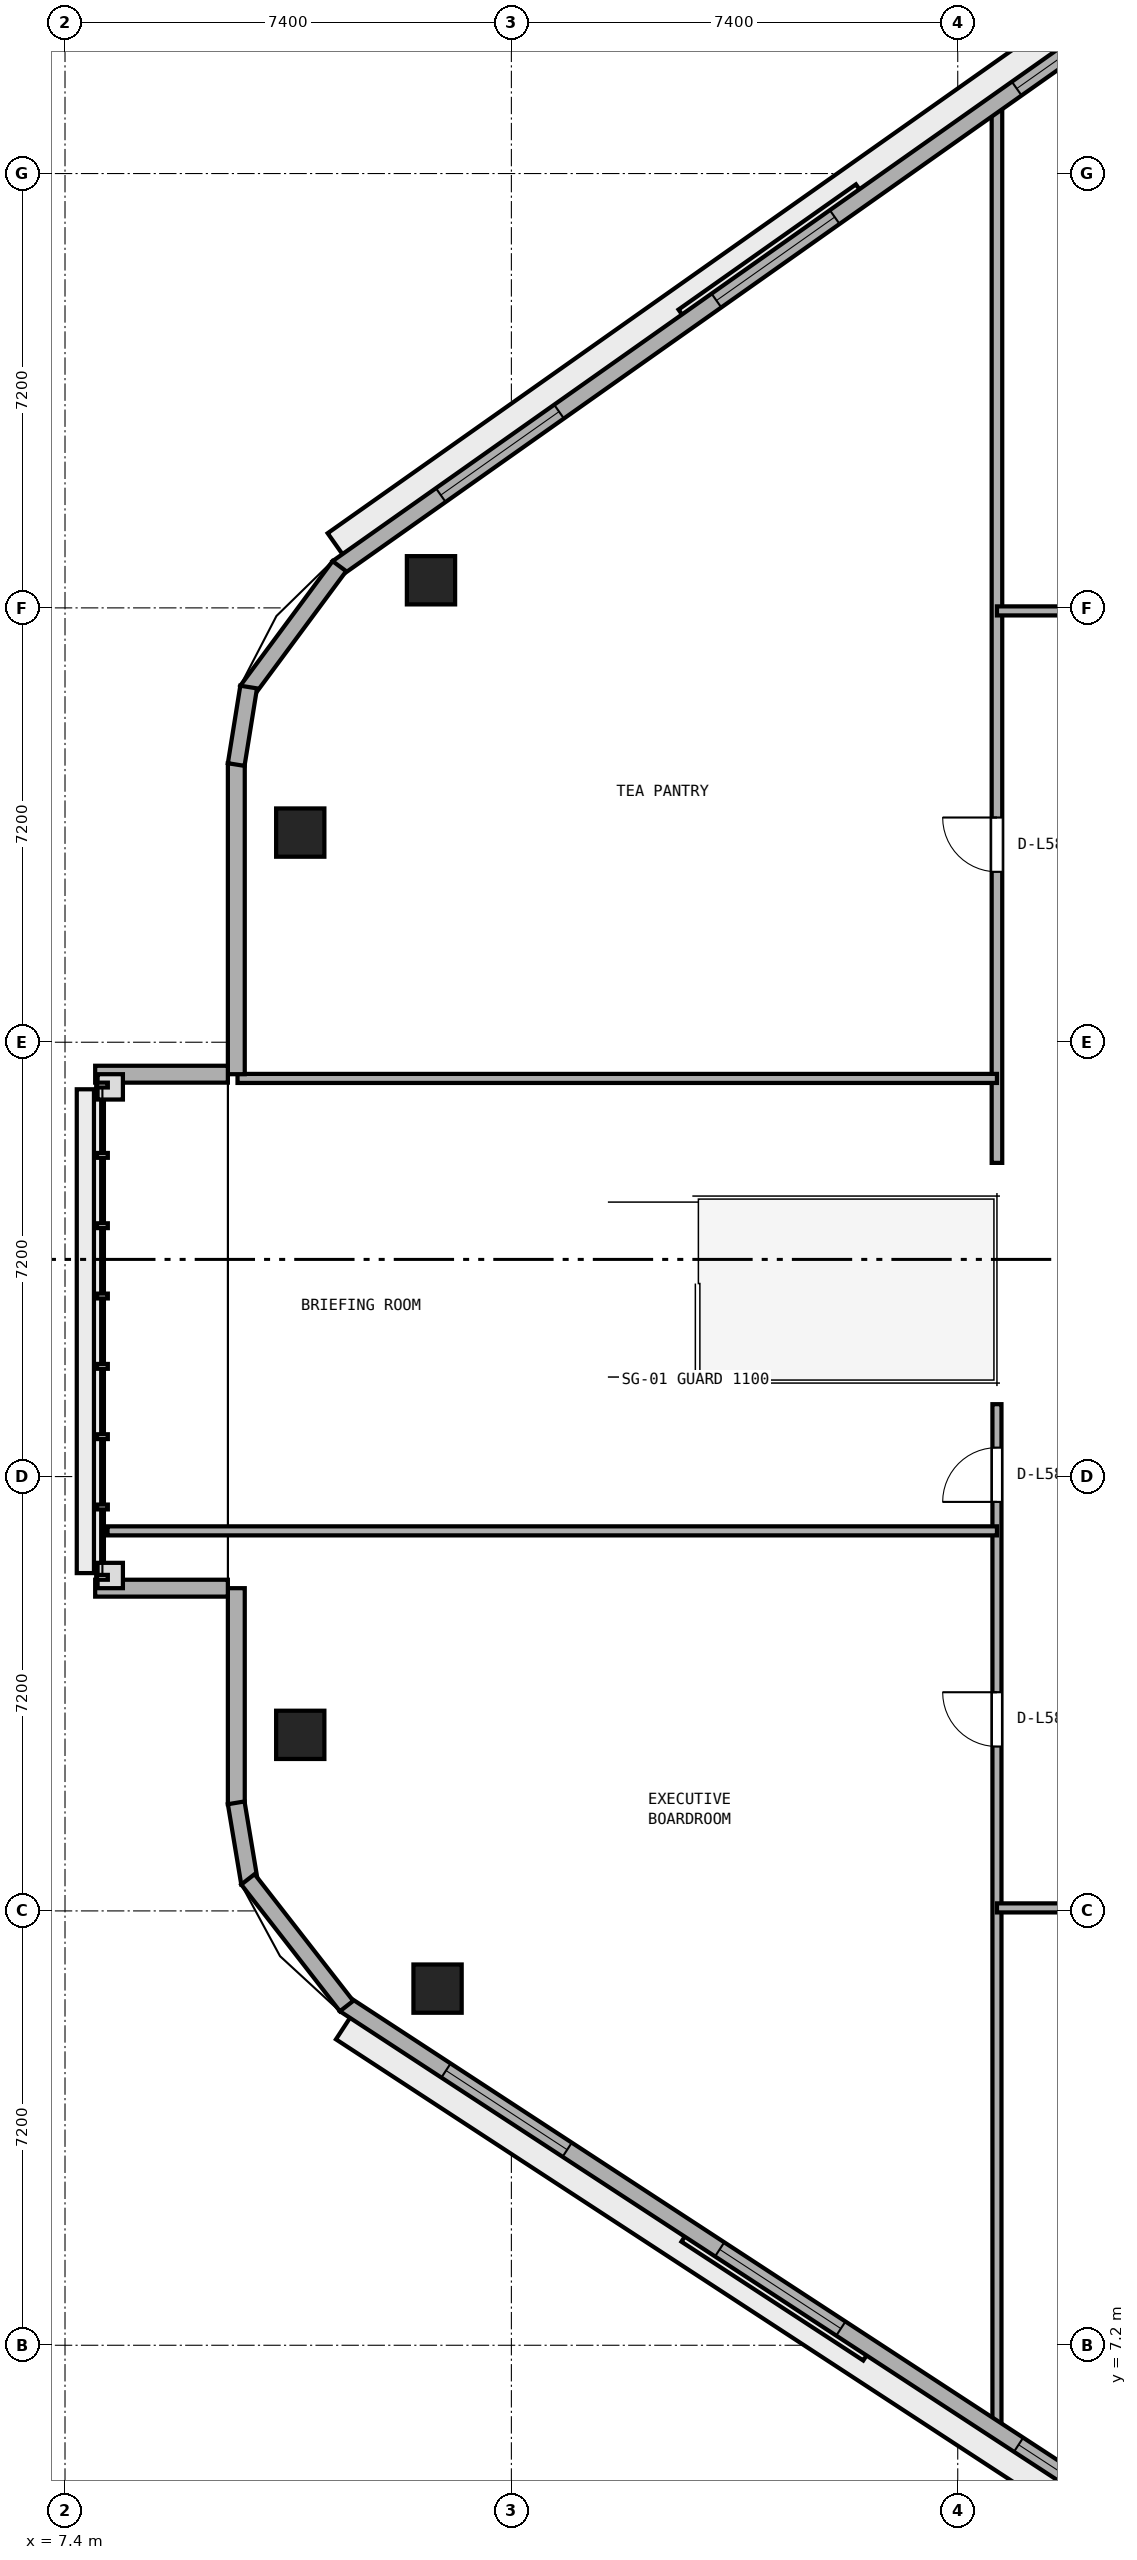
"""IFC4 building model, lengths in metres.
Left out: names, types, materials, properties, quantities, classifications, styles, units other than length and angle.
Written with IfcOpenShell. Run it as: python <this file> out.ifc"""

import sys

from ifc_helpers import new_model, si_unit, direction, frame, frame_2d, origin, origin_2d, place, context, subcontext, project, spatial, rectangle, extrude, element, fill, save


model = new_model("IFC4")
c1 = context("Model", 3, precision=1e-05, world=origin(), true_north=direction((0.0, 1.0)))
c2 = subcontext(c1, "Body", "Model", "MODEL_VIEW")
j1 = project(units=[si_unit("LENGTHUNIT", "METRE"), si_unit("PLANEANGLEUNIT", "RADIAN")], contexts=[c1])
p1 = place(None, origin())
s1 = spatial("IfcSite", under=j1, at=p1, CompositionType="ELEMENT")
p2 = place(p1, origin())
s2 = spatial("IfcBuilding", under=s1, at=p2, CompositionType="ELEMENT")
p3 = place(p2, frame((0.0, 0.0, 228.8)))
s3 = spatial("IfcBuildingStorey", under=s2, at=p3, CompositionType="ELEMENT", Elevation=228.8)
for number, where, z_axis, x_axis in (
    (1, (13.467, 36.458, 0.0), (0.0, 0.0, 1.0), (1.0, 0.0, 0.0)),
    (2, (11.3, 32.275, 0.0), (0.0, 0.0, 1.0), (1.0, 0.0, 0.0)),
    (3, (11.3, 17.319, 0.0), (0.0, 0.0, 1.0), (1.0, 0.0, 0.0)),
    (4, (13.576, 13.112, 0.0), (0.0, 0.0, 1.0), (1.0, 0.0, 0.0)),
):
    element("IfcColumn", number, at=place(p3, frame(where, z_axis=z_axis, x_axis=x_axis)), inside=s3, PredefinedType="COLUMN", context=c2, shape_type="SweptSolid", body=[
        extrude(rectangle(XDim=0.8, YDim=0.8, at=origin_2d()), origin(), (0.0, 0.0, 1.0), 3.8),
    ])
p4 = place(p3, frame((22.85, 5.758, 0.0), z_axis=(0.0, 0.0, 1.0), x_axis=(0.0, 1.0, 0.0)))
e5 = element("IfcWall", 5, at=p4, inside=s3, PredefinedType="PARTITIONING", context=c2, shape_type="SweptSolid", body=[
    extrude(rectangle(XDim=17.042, YDim=0.15, at=frame_2d((8.521, 0.0))), origin(), (0.0, 0.0, 1.0), 3.51),
])
p5 = place(p4, frame((11.367, 0.0, 0.0)))
e6 = element("IfcOpeningElement", 6, at=p5, cuts=e5, PredefinedType="OPENING", context=c2, shape_type="SweptSolid", body=[
    extrude(rectangle(XDim=0.9, YDim=2.1, at=frame_2d((0.45, 1.05))), frame((0.0, 0.085, 0.0), z_axis=(0.0, -1.0, 0.0), x_axis=(1.0, 0.0, 0.0)), (0.0, 0.0, 1.0), 0.17),
])
p6 = place(p4, frame((15.422, 0.0, 0.0)))
e7 = element("IfcOpeningElement", 7, at=p6, cuts=e5, PredefinedType="OPENING", context=c2, shape_type="SweptSolid", body=[
    extrude(rectangle(XDim=0.9, YDim=2.1, at=frame_2d((0.45, 1.05))), frame((0.0, 0.085, 0.0), z_axis=(0.0, -1.0, 0.0), x_axis=(1.0, 0.0, 0.0)), (0.0, 0.0, 1.0), 0.17),
])
p7 = place(p3, frame((22.85, 26.8, 0.0), z_axis=(0.0, 0.0, 1.0), x_axis=(0.0, 1.0, 0.0)))
e8 = element("IfcWall", 8, at=p7, inside=s3, PredefinedType="PARTITIONING", context=c2, shape_type="SweptSolid", body=[
    extrude(rectangle(XDim=17.608, YDim=0.175, at=frame_2d((8.804, 0.0))), origin(), (0.0, 0.0, 1.0), 3.51),
])
p8 = place(p7, frame((4.825, 0.0, 0.0)))
e9 = element("IfcOpeningElement", 9, at=p8, cuts=e8, PredefinedType="OPENING", context=c2, shape_type="SweptSolid", body=[
    extrude(rectangle(XDim=0.9, YDim=2.1, at=frame_2d((0.45, 1.05))), frame((0.0, 0.097, 0.0), z_axis=(0.0, -1.0, 0.0), x_axis=(1.0, 0.0, 0.0)), (0.0, 0.0, 1.0), 0.195),
])
p9 = place(p3, frame((22.85, 14.45, 0.0), z_axis=(0.0, 0.0, 1.0), x_axis=(1.0, 0.0, 0.0)))
e10 = element("IfcWall", 10, at=p9, inside=s3, PredefinedType="PARTITIONING", context=c2, shape_type="SweptSolid", body=[
    extrude(rectangle(XDim=12.8, YDim=0.15, at=frame_2d((6.4, 0.0))), origin(), (0.0, 0.0, 1.0), 3.51),
])
p10 = place(p9, frame((5.9, 0.0, 0.0)))
e11 = element("IfcOpeningElement", 11, at=p10, cuts=e10, PredefinedType="OPENING", context=c2, shape_type="SweptSolid", body=[
    extrude(rectangle(XDim=1.0, YDim=2.12, at=frame_2d((0.5, 1.06))), frame((0.0, 0.085, 0.0), z_axis=(0.0, -1.0, 0.0), x_axis=(1.0, 0.0, 0.0)), (0.0, 0.0, 1.0), 0.17),
])
p11 = place(p3, frame((8.105, 20.7, 0.0), z_axis=(0.0, 0.0, 1.0), x_axis=(1.0, 0.0, 0.0)))
e12 = element("IfcWall", 12, at=p11, inside=s3, PredefinedType="PARTITIONING", context=c2, shape_type="SweptSolid", body=[
    extrude(rectangle(XDim=14.745, YDim=0.15, at=frame_2d((7.373, 0.0))), origin(), (0.0, 0.0, 1.0), 3.51),
])
p12 = place(p3, frame((10.26, 28.2, 0.0), z_axis=(0.0, 0.0, 1.0), x_axis=(1.0, 0.0, 0.0)))
e13 = element("IfcWall", 13, at=p12, inside=s3, PredefinedType="PARTITIONING", context=c2, shape_type="SweptSolid", body=[
    extrude(rectangle(XDim=12.59, YDim=0.15, at=frame_2d((6.295, 0.0))), origin(), (0.0, 0.0, 1.0), 3.51),
])
p13 = place(p3, frame((22.85, 35.95, 0.0), z_axis=(0.0, 0.0, 1.0), x_axis=(1.0, 0.0, 0.0)))
e14 = element("IfcWall", 14, at=p13, inside=s3, PredefinedType="PARTITIONING", context=c2, shape_type="SweptSolid", body=[
    extrude(rectangle(XDim=25.75, YDim=0.15, at=frame_2d((12.875, 0.0))), origin(), (0.0, 0.0, 1.0), 3.51),
])
p14 = place(p13, frame((3.395, 0.0, 0.0)))
e15 = element("IfcOpeningElement", 15, at=p14, cuts=e14, PredefinedType="OPENING", context=c2, shape_type="SweptSolid", body=[
    extrude(rectangle(XDim=1.0, YDim=2.12, at=frame_2d((0.5, 1.06))), frame((0.0, 0.085, 0.0), z_axis=(0.0, -1.0, 0.0), x_axis=(1.0, 0.0, 0.0)), (0.0, 0.0, 1.0), 0.17),
])
p15 = place(p13, frame((16.03, 0.0, 0.0)))
e16 = element("IfcOpeningElement", 16, at=p15, cuts=e14, PredefinedType="OPENING", context=c2, shape_type="SweptSolid", body=[
    extrude(rectangle(XDim=1.0, YDim=2.12, at=frame_2d((0.5, 1.06))), frame((0.0, 0.085, 0.0), z_axis=(0.0, -1.0, 0.0), x_axis=(1.0, 0.0, 0.0)), (0.0, 0.0, 1.0), 0.17),
])
p16 = place(p3, frame((26.443, 46.913, 0.0), z_axis=(0.0, 0.0, 1.0), x_axis=(-0.817024179766, -0.576603407619, 0.0)))
e17 = element("IfcWall", 17, at=p16, inside=s3, PredefinedType="STANDARD", context=c2, shape_type="SweptSolid", body=[
    extrude(rectangle(XDim=17.78, YDim=0.28, at=frame_2d((8.89, 0.0))), origin(), (0.0, 0.0, 1.0), 3.51),
])
p17 = place(p16, frame((1.597, 0.0, 0.9)))
e18 = element("IfcOpeningElement", 18, at=p17, cuts=e17, PredefinedType="OPENING", context=c2, shape_type="SweptSolid", body=[
    extrude(rectangle(XDim=2.4, YDim=1.75, at=frame_2d((1.2, 0.875))), frame((0.0, 0.15, 0.0), z_axis=(0.0, -1.0, 0.0), x_axis=(1.0, 0.0, 0.0)), (0.0, 0.0, 1.0), 0.3),
])
p18 = place(p16, frame((7.69, 0.0, 0.9)))
e19 = element("IfcOpeningElement", 19, at=p18, cuts=e17, PredefinedType="OPENING", context=c2, shape_type="SweptSolid", body=[
    extrude(rectangle(XDim=2.4, YDim=1.75, at=frame_2d((1.2, 0.875))), frame((0.0, 0.15, 0.0), z_axis=(0.0, -1.0, 0.0), x_axis=(1.0, 0.0, 0.0)), (0.0, 0.0, 1.0), 0.3),
])
p19 = place(p16, frame((13.283, 0.0, 0.9)))
e20 = element("IfcOpeningElement", 20, at=p19, cuts=e17, PredefinedType="OPENING", context=c2, shape_type="SweptSolid", body=[
    extrude(rectangle(XDim=2.4, YDim=1.75, at=frame_2d((1.2, 0.875))), frame((0.0, 0.15, 0.0), z_axis=(0.0, -1.0, 0.0), x_axis=(1.0, 0.0, 0.0)), (0.0, 0.0, 1.0), 0.3),
])
p20 = place(p3, frame((10.24, 33.425, 0.0), z_axis=(0.0, 0.0, 1.0), x_axis=(0.0, -1.0, 0.0)))
e21 = element("IfcWall", 21, at=p20, inside=s3, PredefinedType="STANDARD", context=c2, shape_type="SweptSolid", body=[
    extrude(rectangle(XDim=5.155, YDim=0.28, at=frame_2d((2.578, 0.0))), origin(), (0.0, 0.0, 1.0), 3.51),
])
p21 = place(p3, frame((10.24, 19.75, 0.0), z_axis=(0.0, 0.0, 1.0), x_axis=(0.0, -1.0, 0.0)))
e22 = element("IfcWall", 22, at=p21, inside=s3, PredefinedType="STANDARD", context=c2, shape_type="SweptSolid", body=[
    extrude(rectangle(XDim=3.581, YDim=0.28, at=frame_2d((1.791, 0.0))), origin(), (0.0, 0.0, 1.0), 3.51),
])
p22 = place(p3, frame((12.034, 12.854, 0.0), z_axis=(0.0, 0.0, 1.0), x_axis=(0.837118352984, -0.547021812269, 0.0)))
e23 = element("IfcWall", 23, at=p22, inside=s3, PredefinedType="STANDARD", context=c2, shape_type="SweptSolid", body=[
    extrude(rectangle(XDim=17.259, YDim=0.28, at=frame_2d((8.63, 0.0))), origin(), (0.0, 0.0, 1.0), 3.51),
])
p23 = place(p22, frame((2.01, 0.0, 0.9)))
e24 = element("IfcOpeningElement", 24, at=p23, cuts=e23, PredefinedType="OPENING", context=c2, shape_type="SweptSolid", body=[
    extrude(rectangle(XDim=2.4, YDim=1.75, at=frame_2d((1.2, 0.875))), frame((0.0, 0.15, 0.0), z_axis=(0.0, -1.0, 0.0), x_axis=(1.0, 0.0, 0.0)), (0.0, 0.0, 1.0), 0.3),
])
p24 = place(p22, frame((7.43, 0.0, 0.9)))
e25 = element("IfcOpeningElement", 25, at=p24, cuts=e23, PredefinedType="OPENING", context=c2, shape_type="SweptSolid", body=[
    extrude(rectangle(XDim=2.4, YDim=1.75, at=frame_2d((1.2, 0.875))), frame((0.0, 0.15, 0.0), z_axis=(0.0, -1.0, 0.0), x_axis=(1.0, 0.0, 0.0)), (0.0, 0.0, 1.0), 0.3),
])
p25 = place(p22, frame((13.349, 0.0, 0.9)))
e26 = element("IfcOpeningElement", 26, at=p25, cuts=e23, PredefinedType="OPENING", context=c2, shape_type="SweptSolid", body=[
    extrude(rectangle(XDim=2.4, YDim=1.75, at=frame_2d((1.2, 0.875))), frame((0.0, 0.15, 0.0), z_axis=(0.0, -1.0, 0.0), x_axis=(1.0, 0.0, 0.0)), (0.0, 0.0, 1.0), 0.3),
])
p26 = place(p3, frame((11.948, 36.692, 0.0), z_axis=(0.0, 0.0, 1.0), x_axis=(-0.595170751493, -0.803599263668, 0.0)))
e27 = element("IfcWall", 27, at=p26, inside=s3, PredefinedType="STANDARD", context=c2, shape_type="SweptSolid", body=[
    extrude(rectangle(XDim=2.57, YDim=0.28, at=frame_2d((1.285, 0.0))), origin(), (0.0, 0.0, 1.0), 3.51),
])
p27 = place(p3, frame((10.445, 34.688, 0.0), z_axis=(0.0, 0.0, 1.0), x_axis=(-0.158524605336, -0.987355027081, 0.0)))
e28 = element("IfcWall", 28, at=p27, inside=s3, PredefinedType="STANDARD", context=c2, shape_type="SweptSolid", body=[
    extrude(rectangle(XDim=1.301, YDim=0.28, at=frame_2d((0.651, 0.0))), origin(), (0.0, 0.0, 1.0), 3.51),
])
p28 = place(p3, frame((10.238, 16.192, 0.0), z_axis=(0.0, 0.0, 1.0), x_axis=(0.164604311367, -0.986359681191, 0.0)))
e29 = element("IfcWall", 29, at=p28, inside=s3, PredefinedType="STANDARD", context=c2, shape_type="SweptSolid", body=[
    extrude(rectangle(XDim=1.35, YDim=0.28, at=frame_2d((0.675, 0.0))), origin(), (0.0, 0.0, 1.0), 3.51),
])
p29 = place(p3, frame((10.433, 14.923, 0.0), z_axis=(0.0, 0.0, 1.0), x_axis=(0.614181852676, -0.78916452774, 0.0)))
e30 = element("IfcWall", 30, at=p29, inside=s3, PredefinedType="STANDARD", context=c2, shape_type="SweptSolid", body=[
    extrude(rectangle(XDim=2.662, YDim=0.28, at=frame_2d((1.331, 0.0))), origin(), (0.0, 0.0, 1.0), 3.51),
])
for number, where, z_axis, x_axis in (
    (31, (7.9, 19.75, 0.0), (0.0, 0.0, 1.0), (1.0, 0.0, 0.0)),
    (32, (7.9, 28.27, 0.0), (0.0, 0.0, 1.0), (1.0, 0.0, 0.0)),
):
    element("IfcWall", number, at=place(p3, frame(where, z_axis=z_axis, x_axis=x_axis)), inside=s3, PredefinedType="STANDARD", context=c2, shape_type="SweptSolid", body=[
        extrude(rectangle(XDim=2.2, YDim=0.28, at=frame_2d((1.1, 0.0))), origin(), (0.0, 0.0, 1.0), 3.51),
    ])
p30 = place(p5, origin())
e33 = element("IfcDoor", 33, at=p30, inside=s3, OperationType="SINGLE_SWING_RIGHT", PredefinedType="DOOR", context=c2, shape_type="SweptSolid", body=[
    extrude(rectangle(XDim=0.9, YDim=2.1, at=frame_2d((0.45, 1.05))), frame((0.0, 0.025, 0.0), z_axis=(0.0, -1.0, 0.0), x_axis=(1.0, 0.0, 0.0)), (0.0, 0.0, 1.0), 0.05),
])
fill(e6, e33)
p31 = place(p6, origin())
e34 = element("IfcDoor", 34, at=p31, inside=s3, OperationType="SINGLE_SWING_LEFT", PredefinedType="DOOR", context=c2, shape_type="SweptSolid", body=[
    extrude(rectangle(XDim=0.9, YDim=2.1, at=frame_2d((0.45, 1.05))), frame((0.0, 0.025, 0.0), z_axis=(0.0, -1.0, 0.0), x_axis=(1.0, 0.0, 0.0)), (0.0, 0.0, 1.0), 0.05),
])
fill(e7, e34)
p32 = place(p8, origin())
e35 = element("IfcDoor", 35, at=p32, inside=s3, OperationType="SINGLE_SWING_RIGHT", PredefinedType="DOOR", context=c2, shape_type="SweptSolid", body=[
    extrude(rectangle(XDim=0.9, YDim=2.1, at=frame_2d((0.45, 1.05))), frame((0.0, 0.025, 0.0), z_axis=(0.0, -1.0, 0.0), x_axis=(1.0, 0.0, 0.0)), (0.0, 0.0, 1.0), 0.05),
])
fill(e9, e35)
p33 = place(p17, origin())
e36 = element("IfcWindow", 36, at=p33, inside=s3, PartitioningType="SINGLE_PANEL", PredefinedType="WINDOW", context=c2, shape_type="SweptSolid", body=[
    extrude(rectangle(XDim=2.4, YDim=1.75, at=frame_2d((1.2, 0.875))), frame((0.0, 0.03, 0.0), z_axis=(0.0, -1.0, 0.0), x_axis=(1.0, 0.0, 0.0)), (0.0, 0.0, 1.0), 0.06),
])
fill(e18, e36)
p34 = place(p18, origin())
e37 = element("IfcWindow", 37, at=p34, inside=s3, PartitioningType="SINGLE_PANEL", PredefinedType="WINDOW", context=c2, shape_type="SweptSolid", body=[
    extrude(rectangle(XDim=2.4, YDim=1.75, at=frame_2d((1.2, 0.875))), frame((0.0, 0.03, 0.0), z_axis=(0.0, -1.0, 0.0), x_axis=(1.0, 0.0, 0.0)), (0.0, 0.0, 1.0), 0.06),
])
fill(e19, e37)
p35 = place(p19, origin())
e38 = element("IfcWindow", 38, at=p35, inside=s3, PartitioningType="SINGLE_PANEL", PredefinedType="WINDOW", context=c2, shape_type="SweptSolid", body=[
    extrude(rectangle(XDim=2.4, YDim=1.75, at=frame_2d((1.2, 0.875))), frame((0.0, 0.03, 0.0), z_axis=(0.0, -1.0, 0.0), x_axis=(1.0, 0.0, 0.0)), (0.0, 0.0, 1.0), 0.06),
])
fill(e20, e38)
p36 = place(p23, origin())
e39 = element("IfcWindow", 39, at=p36, inside=s3, PartitioningType="SINGLE_PANEL", PredefinedType="WINDOW", context=c2, shape_type="SweptSolid", body=[
    extrude(rectangle(XDim=2.4, YDim=1.75, at=frame_2d((1.2, 0.875))), frame((0.0, 0.03, 0.0), z_axis=(0.0, -1.0, 0.0), x_axis=(1.0, 0.0, 0.0)), (0.0, 0.0, 1.0), 0.06),
])
fill(e24, e39)
p37 = place(p24, origin())
e40 = element("IfcWindow", 40, at=p37, inside=s3, PartitioningType="SINGLE_PANEL", PredefinedType="WINDOW", context=c2, shape_type="SweptSolid", body=[
    extrude(rectangle(XDim=2.4, YDim=1.75, at=frame_2d((1.2, 0.875))), frame((0.0, 0.03, 0.0), z_axis=(0.0, -1.0, 0.0), x_axis=(1.0, 0.0, 0.0)), (0.0, 0.0, 1.0), 0.06),
])
fill(e25, e40)
p38 = place(p25, origin())
e41 = element("IfcWindow", 41, at=p38, inside=s3, PartitioningType="SINGLE_PANEL", PredefinedType="WINDOW", context=c2, shape_type="SweptSolid", body=[
    extrude(rectangle(XDim=2.4, YDim=1.75, at=frame_2d((1.2, 0.875))), frame((0.0, 0.03, 0.0), z_axis=(0.0, -1.0, 0.0), x_axis=(1.0, 0.0, 0.0)), (0.0, 0.0, 1.0), 0.06),
])
fill(e26, e41)
save(model, sys.argv[1])
